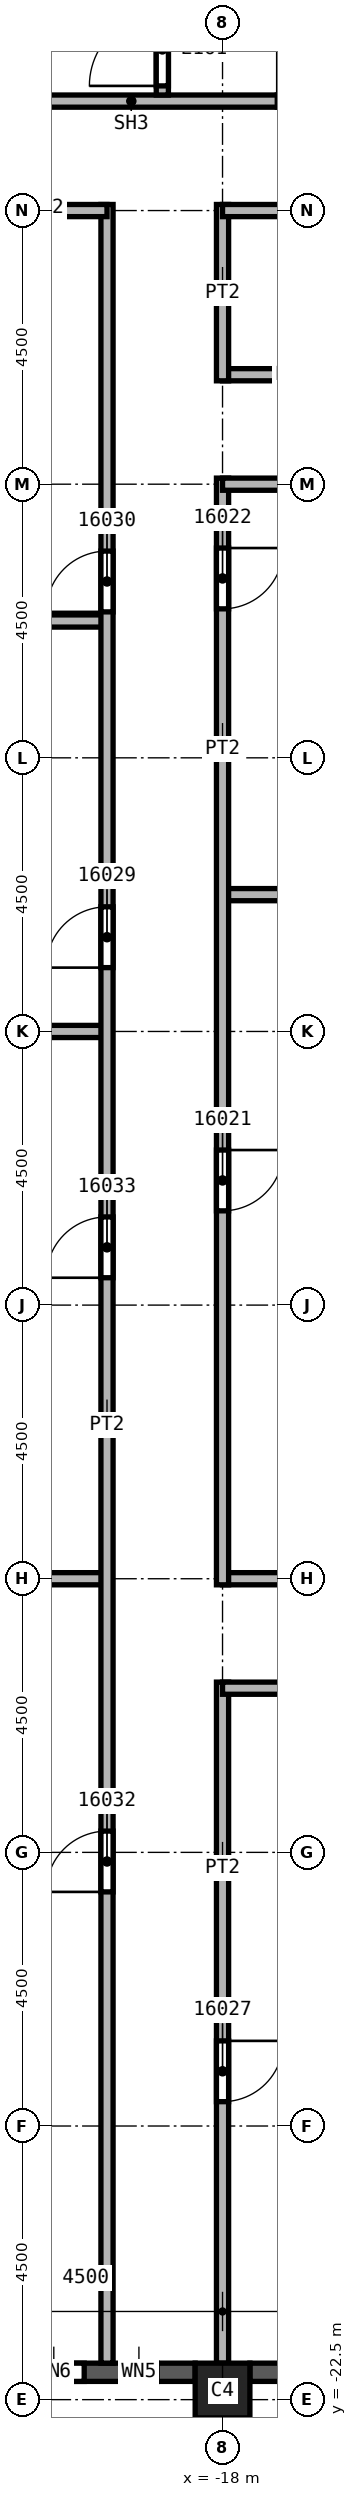
"""IFC4 building model, lengths in metres.
Left out: names, types, materials, properties, quantities, classifications, styles, units other than length and angle.
Written with IfcOpenShell. Run it as: python <this file> out.ifc"""

import sys

from ifc_helpers import new_model, si_unit, direction, frame, frame_2d, origin, origin_2d, place, context, subcontext, project, spatial, rectangle, extrude, element, fill, save


model = new_model("IFC4")
c1 = context("Model", 3, precision=1e-05, world=origin(), true_north=direction((0.0, 1.0)))
c2 = subcontext(c1, "Body", "Model", "MODEL_VIEW")
j1 = project(units=[si_unit("LENGTHUNIT", "METRE"), si_unit("PLANEANGLEUNIT", "RADIAN")], contexts=[c1])
p1 = place(None, origin())
s1 = spatial("IfcSite", under=j1, at=p1, CompositionType="ELEMENT")
p2 = place(p1, origin())
s2 = spatial("IfcBuilding", under=s1, at=p2, CompositionType="ELEMENT")
p3 = place(p2, frame((0.0, 0.0, 246.0)))
s3 = spatial("IfcBuildingStorey", under=s2, at=p3, CompositionType="ELEMENT", Elevation=246.0)
p4 = place(p3, frame((-18.0, -22.35, 0.0), z_axis=(0.0, 0.0, 1.0), x_axis=(1.0, 0.0, 0.0)))
e1 = element("IfcColumn", 1, at=p4, inside=s3, PredefinedType="COLUMN", context=c2, shape_type="SweptSolid", body=[
    extrude(rectangle(XDim=0.9, YDim=0.9, at=origin_2d()), origin(), (0.0, 0.0, 1.0), 3.72),
])
p5 = place(p3, frame((-22.05, -22.05, 0.0), z_axis=(0.0, 0.0, 1.0), x_axis=(1.0, 0.0, 0.0)))
e2 = element("IfcWall", 2, at=p5, inside=s3, PredefinedType="SOLIDWALL", context=c2, shape_type="SweptSolid", body=[
    extrude(rectangle(XDim=3.6, YDim=0.3, at=frame_2d((1.8, 0.0))), origin(), (0.0, 0.0, 1.0), 3.12),
])
p6 = place(p5, frame((0.775, 0.0, 0.8)))
e3 = element("IfcOpeningElement", 3, at=p6, cuts=e2, PredefinedType="OPENING", context=c2, shape_type="SweptSolid", body=[
    extrude(rectangle(XDim=1.0, YDim=1.95, at=frame_2d((0.5, 0.975))), frame((0.0, 0.15, 0.0), z_axis=(0.0, -1.0, 0.0), x_axis=(1.0, 0.0, 0.0)), (0.0, 0.0, 1.0), 0.3),
])
p7 = place(p5, frame((2.375, 0.0, 0.8)))
e4 = element("IfcOpeningElement", 4, at=p7, cuts=e2, PredefinedType="OPENING", context=c2, shape_type="SweptSolid", body=[
    extrude(rectangle(XDim=0.6, YDim=1.95, at=frame_2d((0.3, 0.975))), frame((0.0, 0.15, 0.0), z_axis=(0.0, -1.0, 0.0), x_axis=(1.0, 0.0, 0.0)), (0.0, 0.0, 1.0), 0.3),
])
p8 = place(p3, frame((-17.55, -22.05, 0.0), z_axis=(0.0, 0.0, 1.0), x_axis=(1.0, 0.0, 0.0)))
e5 = element("IfcWall", 5, at=p8, inside=s3, PredefinedType="SOLIDWALL", context=c2, shape_type="SweptSolid", body=[
    extrude(rectangle(XDim=3.6, YDim=0.3, at=frame_2d((1.8, 0.0))), origin(), (0.0, 0.0, 1.0), 3.12),
])
p9 = place(p8, frame((0.6, 0.0, 0.8)))
e6 = element("IfcOpeningElement", 6, at=p9, cuts=e5, PredefinedType="OPENING", context=c2, shape_type="SweptSolid", body=[
    extrude(rectangle(XDim=2.4, YDim=1.95, at=frame_2d((1.2, 0.975))), frame((0.0, 0.15, 0.0), z_axis=(0.0, -1.0, 0.0), x_axis=(1.0, 0.0, 0.0)), (0.0, 0.0, 1.0), 0.3),
])
p10 = place(p3, frame((-26.55, -9.0, 0.0), z_axis=(0.0, 0.0, 1.0), x_axis=(1.0, 0.0, 0.0)))
e7 = element("IfcWall", 7, at=p10, inside=s3, PredefinedType="PARTITIONING", context=c2, shape_type="SweptSolid", body=[
    extrude(rectangle(XDim=6.65, YDim=0.2, at=frame_2d((3.325, 0.0))), origin(), (0.0, 0.0, 1.0), 3.72),
])
p11 = place(p3, frame((-24.5, 6.75, 0.0), z_axis=(0.0, 0.0, 1.0), x_axis=(1.0, 0.0, 0.0)))
e8 = element("IfcWall", 8, at=p11, inside=s3, PredefinedType="PARTITIONING", context=c2, shape_type="SweptSolid", body=[
    extrude(rectangle(XDim=4.6, YDim=0.2, at=frame_2d((2.3, 0.0))), origin(), (0.0, 0.0, 1.0), 3.72),
])
p12 = place(p3, frame((-19.9, 0.0, 0.0), z_axis=(0.0, 0.0, 1.0), x_axis=(-1.0, 0.0, 0.0)))
e9 = element("IfcWall", 9, at=p12, inside=s3, PredefinedType="PARTITIONING", context=c2, shape_type="SweptSolid", body=[
    extrude(rectangle(XDim=6.65, YDim=0.2, at=frame_2d((3.325, 0.0))), origin(), (0.0, 0.0, 1.0), 3.72),
])
p13 = place(p3, frame((-19.9, -21.9, 0.0), z_axis=(0.0, 0.0, 1.0), x_axis=(0.0, 1.0, 0.0)))
e10 = element("IfcWall", 10, at=p13, inside=s3, PredefinedType="PARTITIONING", context=c2, shape_type="SweptSolid", body=[
    extrude(rectangle(XDim=35.5, YDim=0.2, at=frame_2d((17.75, 0.0))), origin(), (0.0, 0.0, 1.0), 3.72),
])
p14 = place(p13, frame((22.95, 0.0, 0.0)))
e11 = element("IfcOpeningElement", 11, at=p14, cuts=e10, PredefinedType="OPENING", context=c2, shape_type="SweptSolid", body=[
    extrude(rectangle(XDim=1.0, YDim=2.1, at=frame_2d((0.5, 1.05))), frame((0.0, 0.1, 0.0), z_axis=(0.0, -1.0, 0.0), x_axis=(1.0, 0.0, 0.0)), (0.0, 0.0, 1.0), 0.2),
])
p15 = place(p13, frame((28.8, 0.0, 0.0)))
e12 = element("IfcOpeningElement", 12, at=p15, cuts=e10, PredefinedType="OPENING", context=c2, shape_type="SweptSolid", body=[
    extrude(rectangle(XDim=1.0, YDim=2.1, at=frame_2d((0.5, 1.05))), frame((0.0, 0.1, 0.0), z_axis=(0.0, -1.0, 0.0), x_axis=(1.0, 0.0, 0.0)), (0.0, 0.0, 1.0), 0.2),
])
p16 = place(p13, frame((7.75, 0.0, 0.0)))
e13 = element("IfcOpeningElement", 13, at=p16, cuts=e10, PredefinedType="OPENING", context=c2, shape_type="SweptSolid", body=[
    extrude(rectangle(XDim=1.0, YDim=2.1, at=frame_2d((0.5, 1.05))), frame((0.0, 0.1, 0.0), z_axis=(0.0, -1.0, 0.0), x_axis=(1.0, 0.0, 0.0)), (0.0, 0.0, 1.0), 0.2),
])
p17 = place(p13, frame((17.85, 0.0, 0.0)))
e14 = element("IfcOpeningElement", 14, at=p17, cuts=e10, PredefinedType="OPENING", context=c2, shape_type="SweptSolid", body=[
    extrude(rectangle(XDim=1.0, YDim=2.1, at=frame_2d((0.5, 1.05))), frame((0.0, 0.1, 0.0), z_axis=(0.0, -1.0, 0.0), x_axis=(1.0, 0.0, 0.0)), (0.0, 0.0, 1.0), 0.2),
])
p18 = place(p3, frame((-19.9, 13.5, 0.0), z_axis=(0.0, 0.0, 1.0), x_axis=(-1.0, 0.0, 0.0)))
e15 = element("IfcWall", 15, at=p18, inside=s3, PredefinedType="PARTITIONING", context=c2, shape_type="SweptSolid", body=[
    extrude(rectangle(XDim=2.1, YDim=0.2, at=frame_2d((1.05, 0.0))), origin(), (0.0, 0.0, 1.0), 3.72),
])
p19 = place(p3, frame((-18.0, -10.7, 0.0), z_axis=(0.0, 0.0, 1.0), x_axis=(0.0, -1.0, 0.0)))
e16 = element("IfcWall", 16, at=p19, inside=s3, PredefinedType="PARTITIONING", context=c2, shape_type="SweptSolid", body=[
    extrude(rectangle(XDim=11.2, YDim=0.2, at=frame_2d((5.6, 0.0))), origin(), (0.0, 0.0, 1.0), 3.72),
])
p20 = place(p19, frame((5.9, 0.0, 0.0)))
e17 = element("IfcOpeningElement", 17, at=p20, cuts=e16, PredefinedType="OPENING", context=c2, shape_type="SweptSolid", body=[
    extrude(rectangle(XDim=1.0, YDim=2.1, at=frame_2d((0.5, 1.05))), frame((0.0, 0.1, 0.0), z_axis=(0.0, -1.0, 0.0), x_axis=(1.0, 0.0, 0.0)), (0.0, 0.0, 1.0), 0.2),
])
for number, where, z_axis, x_axis in (
    (18, (-18.0, -9.0, 0.0), (0.0, 0.0, 1.0), (1.0, 0.0, 0.0)),
    (19, (-18.0, 2.25, 0.0), (0.0, 0.0, 1.0), (1.0, 0.0, 0.0)),
):
    element("IfcWall", number, at=place(p3, frame(where, z_axis=z_axis, x_axis=x_axis)), inside=s3, PredefinedType="PARTITIONING", context=c2, shape_type="SweptSolid", body=[
        extrude(rectangle(XDim=4.5, YDim=0.2, at=frame_2d((2.25, 0.0))), origin(), (0.0, 0.0, 1.0), 3.72),
    ])
p21 = place(p3, frame((-18.0, 9.1, 0.0), z_axis=(0.0, 0.0, 1.0), x_axis=(0.0, -1.0, 0.0)))
e20 = element("IfcWall", 20, at=p21, inside=s3, PredefinedType="PARTITIONING", context=c2, shape_type="SweptSolid", body=[
    extrude(rectangle(XDim=18.2, YDim=0.2, at=frame_2d((9.1, 0.0))), origin(), (0.0, 0.0, 1.0), 3.72),
])
p22 = place(p21, frame((11.05, 0.0, 0.0)))
e21 = element("IfcOpeningElement", 21, at=p22, cuts=e20, PredefinedType="OPENING", context=c2, shape_type="SweptSolid", body=[
    extrude(rectangle(XDim=1.0, YDim=2.1, at=frame_2d((0.5, 1.05))), frame((0.0, 0.1, 0.0), z_axis=(0.0, -1.0, 0.0), x_axis=(1.0, 0.0, 0.0)), (0.0, 0.0, 1.0), 0.2),
])
p23 = place(p21, frame((1.15, 0.0, 0.0)))
e22 = element("IfcOpeningElement", 22, at=p23, cuts=e20, PredefinedType="OPENING", context=c2, shape_type="SweptSolid", body=[
    extrude(rectangle(XDim=1.0, YDim=2.1, at=frame_2d((0.5, 1.05))), frame((0.0, 0.1, 0.0), z_axis=(0.0, -1.0, 0.0), x_axis=(1.0, 0.0, 0.0)), (0.0, 0.0, 1.0), 0.2),
])
p24 = place(p3, frame((-18.0, 10.8, 0.0), z_axis=(0.0, 0.0, 1.0), x_axis=(1.0, 0.0, 0.0)))
e23 = element("IfcWall", 23, at=p24, inside=s3, PredefinedType="PARTITIONING", context=c2, shape_type="SweptSolid", body=[
    extrude(rectangle(XDim=3.6, YDim=0.2, at=frame_2d((1.8, 0.0))), origin(), (0.0, 0.0, 1.0), 3.72),
])
p25 = place(p24, frame((2.2, 0.0, 0.0)))
e24 = element("IfcOpeningElement", 24, at=p25, cuts=e23, PredefinedType="OPENING", context=c2, shape_type="SweptSolid", body=[
    extrude(rectangle(XDim=1.0, YDim=2.1, at=frame_2d((0.5, 1.05))), frame((0.0, 0.1, 0.0), z_axis=(0.0, -1.0, 0.0), x_axis=(1.0, 0.0, 0.0)), (0.0, 0.0, 1.0), 0.2),
])
p26 = place(p3, frame((-18.0, 13.6, 0.0), z_axis=(0.0, 0.0, 1.0), x_axis=(0.0, -1.0, 0.0)))
e25 = element("IfcWall", 25, at=p26, inside=s3, PredefinedType="PARTITIONING", context=c2, shape_type="SweptSolid", body=[
    extrude(rectangle(XDim=2.9, YDim=0.2, at=frame_2d((1.45, 0.0))), origin(), (0.0, 0.0, 1.0), 3.72),
])
p27 = place(p3, frame((-15.3, 13.5, 0.0), z_axis=(0.0, 0.0, 1.0), x_axis=(-1.0, 0.0, 0.0)))
e26 = element("IfcWall", 26, at=p27, inside=s3, PredefinedType="PARTITIONING", context=c2, shape_type="SweptSolid", body=[
    extrude(rectangle(XDim=2.7, YDim=0.2, at=frame_2d((1.35, 0.0))), origin(), (0.0, 0.0, 1.0), 3.72),
])
p28 = place(p3, frame((-14.4, -10.8, 0.0), z_axis=(0.0, 0.0, 1.0), x_axis=(-1.0, 0.0, 0.0)))
e27 = element("IfcWall", 27, at=p28, inside=s3, PredefinedType="PARTITIONING", context=c2, shape_type="SweptSolid", body=[
    extrude(rectangle(XDim=3.6, YDim=0.2, at=frame_2d((1.8, 0.0))), origin(), (0.0, 0.0, 1.0), 3.72),
])
p29 = place(p3, frame((-13.5, 9.0, 0.0), z_axis=(0.0, 0.0, 1.0), x_axis=(-1.0, 0.0, 0.0)))
e28 = element("IfcWall", 28, at=p29, inside=s3, PredefinedType="PARTITIONING", context=c2, shape_type="SweptSolid", body=[
    extrude(rectangle(XDim=4.5, YDim=0.2, at=frame_2d((2.25, 0.0))), origin(), (0.0, 0.0, 1.0), 3.72),
])
p30 = place(p3, frame((-21.9, 15.3, 0.0), z_axis=(0.0, 0.0, 1.0), x_axis=(1.0, 0.0, 0.0)))
e29 = element("IfcWall", 29, at=p30, inside=s3, PredefinedType="SOLIDWALL", context=c2, shape_type="SweptSolid", body=[
    extrude(rectangle(XDim=8.275, YDim=0.2, at=frame_2d((4.137, 0.0))), origin(), (0.0, 0.0, 1.0), 3.72),
])
p31 = place(p30, frame((4.8, 0.0, 0.0)))
e30 = element("IfcOpeningElement", 30, at=p31, cuts=e29, PredefinedType="OPENING", context=c2, shape_type="SweptSolid", body=[
    extrude(rectangle(XDim=1.2, YDim=2.1, at=frame_2d((0.6, 1.05))), frame((0.0, 0.1, 0.0), z_axis=(0.0, -1.0, 0.0), x_axis=(1.0, 0.0, 0.0)), (0.0, 0.0, 1.0), 0.2),
])
p32 = place(p3, frame((-18.99, 15.4, 0.0), z_axis=(0.0, 0.0, 1.0), x_axis=(0.0, 1.0, 0.0)))
e31 = element("IfcWall", 31, at=p32, inside=s3, PredefinedType="SOLIDWALL", context=c2, shape_type="SweptSolid", body=[
    extrude(rectangle(XDim=5.9, YDim=0.2, at=frame_2d((2.95, 0.0))), origin(), (0.0, 0.0, 1.0), 3.72),
])
p33 = place(p32, frame((0.15, 0.0, 0.0)))
e32 = element("IfcOpeningElement", 32, at=p33, cuts=e31, PredefinedType="OPENING", context=c2, shape_type="SweptSolid", body=[
    extrude(rectangle(XDim=1.2, YDim=2.1, at=frame_2d((0.6, 1.05))), frame((0.0, 0.1, 0.0), z_axis=(0.0, -1.0, 0.0), x_axis=(1.0, 0.0, 0.0)), (0.0, 0.0, 1.0), 0.2),
])
p34 = place(p22, origin())
e33 = element("IfcDoor", 33, at=p34, inside=s3, OperationType="SINGLE_SWING_RIGHT", PredefinedType="DOOR", context=c2, shape_type="SweptSolid", body=[
    extrude(rectangle(XDim=1.0, YDim=2.1, at=frame_2d((0.5, 1.05))), frame((0.0, 0.025, 0.0), z_axis=(0.0, -1.0, 0.0), x_axis=(1.0, 0.0, 0.0)), (0.0, 0.0, 1.0), 0.05),
])
fill(e21, e33)
p35 = place(p23, origin())
e34 = element("IfcDoor", 34, at=p35, inside=s3, OperationType="SINGLE_SWING_LEFT", PredefinedType="DOOR", context=c2, shape_type="SweptSolid", body=[
    extrude(rectangle(XDim=1.0, YDim=2.1, at=frame_2d((0.5, 1.05))), frame((0.0, 0.025, 0.0), z_axis=(0.0, -1.0, 0.0), x_axis=(1.0, 0.0, 0.0)), (0.0, 0.0, 1.0), 0.05),
])
fill(e22, e34)
p36 = place(p20, origin())
e35 = element("IfcDoor", 35, at=p36, inside=s3, OperationType="SINGLE_SWING_RIGHT", PredefinedType="DOOR", context=c2, shape_type="SweptSolid", body=[
    extrude(rectangle(XDim=1.0, YDim=2.1, at=frame_2d((0.5, 1.05))), frame((0.0, 0.025, 0.0), z_axis=(0.0, -1.0, 0.0), x_axis=(1.0, 0.0, 0.0)), (0.0, 0.0, 1.0), 0.05),
])
fill(e17, e35)
p37 = place(p14, origin())
e36 = element("IfcDoor", 36, at=p37, inside=s3, OperationType="SINGLE_SWING_RIGHT", PredefinedType="DOOR", context=c2, shape_type="SweptSolid", body=[
    extrude(rectangle(XDim=1.0, YDim=2.1, at=frame_2d((0.5, 1.05))), frame((0.0, 0.025, 0.0), z_axis=(0.0, -1.0, 0.0), x_axis=(1.0, 0.0, 0.0)), (0.0, 0.0, 1.0), 0.05),
])
fill(e11, e36)
p38 = place(p15, origin())
e37 = element("IfcDoor", 37, at=p38, inside=s3, OperationType="SINGLE_SWING_LEFT", PredefinedType="DOOR", context=c2, shape_type="SweptSolid", body=[
    extrude(rectangle(XDim=1.0, YDim=2.1, at=frame_2d((0.5, 1.05))), frame((0.0, 0.025, 0.0), z_axis=(0.0, -1.0, 0.0), x_axis=(1.0, 0.0, 0.0)), (0.0, 0.0, 1.0), 0.05),
])
fill(e12, e37)
p39 = place(p16, origin())
e38 = element("IfcDoor", 38, at=p39, inside=s3, OperationType="SINGLE_SWING_LEFT", PredefinedType="DOOR", context=c2, shape_type="SweptSolid", body=[
    extrude(rectangle(XDim=1.0, YDim=2.1, at=frame_2d((0.5, 1.05))), frame((0.0, 0.025, 0.0), z_axis=(0.0, -1.0, 0.0), x_axis=(1.0, 0.0, 0.0)), (0.0, 0.0, 1.0), 0.05),
])
fill(e13, e38)
p40 = place(p17, origin())
e39 = element("IfcDoor", 39, at=p40, inside=s3, OperationType="SINGLE_SWING_RIGHT", PredefinedType="DOOR", context=c2, shape_type="SweptSolid", body=[
    extrude(rectangle(XDim=1.0, YDim=2.1, at=frame_2d((0.5, 1.05))), frame((0.0, 0.025, 0.0), z_axis=(0.0, -1.0, 0.0), x_axis=(1.0, 0.0, 0.0)), (0.0, 0.0, 1.0), 0.05),
])
fill(e14, e39)
p41 = place(p33, origin())
e40 = element("IfcDoor", 40, at=p41, inside=s3, OperationType="SINGLE_SWING_LEFT", PredefinedType="DOOR", context=c2, shape_type="SweptSolid", body=[
    extrude(rectangle(XDim=1.2, YDim=2.1, at=frame_2d((0.6, 1.05))), frame((0.0, 0.025, 0.0), z_axis=(0.0, -1.0, 0.0), x_axis=(1.0, 0.0, 0.0)), (0.0, 0.0, 1.0), 0.05),
])
fill(e32, e40)
p42 = place(p6, origin())
e41 = element("IfcWindow", 41, at=p42, inside=s3, PartitioningType="SINGLE_PANEL", PredefinedType="WINDOW", context=c2, shape_type="SweptSolid", body=[
    extrude(rectangle(XDim=1.0, YDim=1.95, at=frame_2d((0.5, 0.975))), frame((0.0, 0.03, 0.0), z_axis=(0.0, -1.0, 0.0), x_axis=(1.0, 0.0, 0.0)), (0.0, 0.0, 1.0), 0.06),
])
fill(e3, e41)
p43 = place(p7, origin())
e42 = element("IfcWindow", 42, at=p43, inside=s3, PartitioningType="SINGLE_PANEL", PredefinedType="WINDOW", context=c2, shape_type="SweptSolid", body=[
    extrude(rectangle(XDim=0.6, YDim=1.95, at=frame_2d((0.3, 0.975))), frame((0.0, 0.03, 0.0), z_axis=(0.0, -1.0, 0.0), x_axis=(1.0, 0.0, 0.0)), (0.0, 0.0, 1.0), 0.06),
])
fill(e4, e42)
save(model, sys.argv[1])
